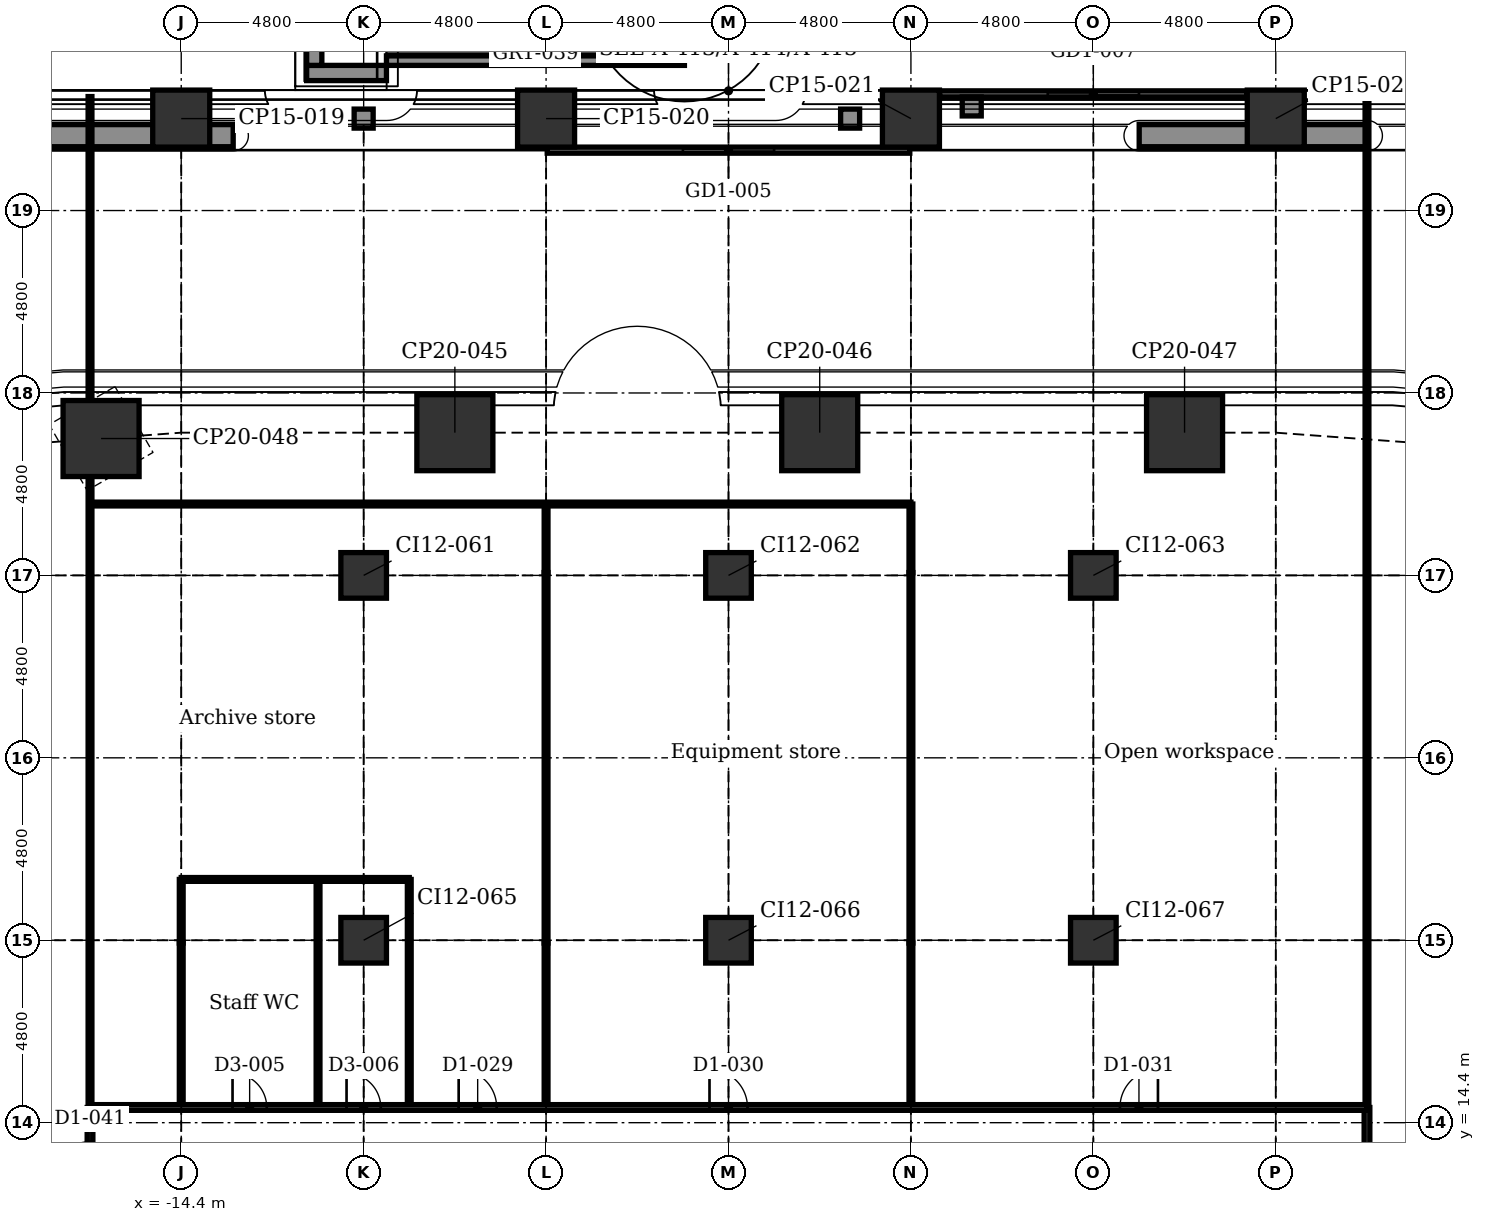
"""IFC4 building model, lengths in metres.
Left out: names, types, materials, properties, quantities, classifications, styles, units other than length and angle.
Written with IfcOpenShell. Run it as: python <this file> out.ifc"""

import sys

from ifc_helpers import new_model, si_unit, direction, frame, frame_2d, origin, origin_2d, place, context, subcontext, project, spatial, polyline, rectangle, outline, extrude, element, fill, save


model = new_model("IFC4")
c1 = context("Model", 3, precision=1e-05, world=origin(), true_north=direction((0.0, 1.0)))
c2 = subcontext(c1, "Body", "Model", "MODEL_VIEW")
j1 = project(units=[si_unit("LENGTHUNIT", "METRE"), si_unit("PLANEANGLEUNIT", "RADIAN")], contexts=[c1])
p1 = place(None, origin())
s1 = spatial("IfcSite", under=j1, at=p1, CompositionType="ELEMENT")
p2 = place(p1, origin())
s2 = spatial("IfcBuilding", under=s1, at=p2, CompositionType="ELEMENT")
p3 = place(p2, frame((0.0, 0.0, 12.4)))
s3 = spatial("IfcBuildingStorey", under=s2, at=p3, CompositionType="ELEMENT", Elevation=12.4)
for number, where, z_axis, x_axis in (
    (1, (-14.4, 40.819, -0.3), (0.0, 0.0, 1.0), (1.0, 0.0, 0.0)),
    (2, (-4.8, 40.819, -0.3), (0.0, 0.0, 1.0), (1.0, 0.0, 0.0)),
    (3, (4.8, 40.819, -0.3), (0.0, 0.0, 1.0), (1.0, 0.0, 0.0)),
    (4, (14.4, 40.819, -0.3), (0.0, 0.0, 1.0), (1.0, 0.0, 0.0)),
):
    element("IfcColumn", number, at=place(p3, frame(where, z_axis=z_axis, x_axis=x_axis)), inside=s3, PredefinedType="COLUMN", context=c2, shape_type="SweptSolid", body=[
        extrude(rectangle(XDim=1.5, YDim=1.5, at=origin_2d()), origin(), (0.0, 0.0, 1.0), 5.05),
    ])
for number, where, z_axis, x_axis in (
    (5, (-16.509, 32.401, -0.3), (0.0, 0.0, 1.0), (0.866, 0.5, 0.0)),
    (6, (-7.2, 32.555, -0.3), (0.0, 0.0, 1.0), (1.0, 0.0, 0.0)),
    (7, (2.4, 32.555, -0.3), (0.0, 0.0, 1.0), (1.0, 0.0, 0.0)),
    (8, (12.0, 32.555, -0.3), (0.0, 0.0, 1.0), (1.0, 0.0, 0.0)),
):
    element("IfcColumn", number, at=place(p3, frame(where, z_axis=z_axis, x_axis=x_axis)), inside=s3, PredefinedType="COLUMN", context=c2, shape_type="SweptSolid", body=[
        extrude(rectangle(XDim=2.0, YDim=2.0, at=origin_2d()), origin(), (0.0, 0.0, 1.0), 5.05),
    ])
for number, where, z_axis, x_axis in (
    (9, (-9.6, 19.2, -0.3), (0.0, 0.0, 1.0), (1.0, 0.0, 0.0)),
    (10, (-9.6, 28.8, -0.3), (0.0, 0.0, 1.0), (1.0, 0.0, 0.0)),
    (11, (0.0, 19.2, -0.3), (0.0, 0.0, 1.0), (1.0, 0.0, 0.0)),
    (12, (0.0, 28.8, -0.3), (0.0, 0.0, 1.0), (1.0, 0.0, 0.0)),
    (13, (9.6, 19.2, -0.3), (0.0, 0.0, 1.0), (1.0, 0.0, 0.0)),
    (14, (9.6, 28.8, -0.3), (0.0, 0.0, 1.0), (1.0, 0.0, 0.0)),
):
    element("IfcColumn", number, at=place(p3, frame(where, z_axis=z_axis, x_axis=x_axis)), inside=s3, PredefinedType="COLUMN", context=c2, shape_type="SweptSolid", body=[
        extrude(rectangle(XDim=1.2, YDim=1.2, at=origin_2d()), origin(), (0.0, 0.0, 1.0), 5.05),
    ])
p4 = place(p3, frame((-4.77, 39.989, 0.0), z_axis=(0.0, 0.0, 1.0), x_axis=(1.0, 0.0, 0.0)))
e15 = element("IfcWall", 15, at=p4, inside=s3, PredefinedType="PARTITIONING", context=c2, shape_type="SweptSolid", body=[
    extrude(rectangle(XDim=9.54, YDim=0.16, at=frame_2d((4.77, 0.0))), origin(), (0.0, 0.0, 1.0), 4.7),
])
p5 = place(p4, frame((3.57, 0.0, 0.0)))
e16 = element("IfcOpeningElement", 16, at=p5, cuts=e15, PredefinedType="OPENING", context=c2, shape_type="SweptSolid", body=[
    extrude(rectangle(XDim=2.4, YDim=2.4, at=frame_2d((1.2, 1.2))), frame((0.0, 0.09, 0.0), z_axis=(0.0, -1.0, 0.0), x_axis=(1.0, 0.0, 0.0)), (0.0, 0.0, 1.0), 0.18),
])
p6 = place(p3, frame((5.552, 41.469, 0.0), z_axis=(0.0, 0.0, 1.0), x_axis=(1.0, 0.0, 0.0)))
e17 = element("IfcWall", 17, at=p6, inside=s3, PredefinedType="PARTITIONING", context=c2, shape_type="SweptSolid", body=[
    extrude(rectangle(XDim=8.096, YDim=0.16, at=frame_2d((4.048, 0.0))), origin(), (0.0, 0.0, 1.0), 4.7),
])
p7 = place(p6, frame((2.848, 0.0, 0.0)))
e18 = element("IfcOpeningElement", 18, at=p7, cuts=e17, PredefinedType="OPENING", context=c2, shape_type="SweptSolid", body=[
    extrude(rectangle(XDim=2.4, YDim=2.4, at=frame_2d((1.2, 1.2))), frame((0.0, 0.09, 0.0), z_axis=(0.0, -1.0, 0.0), x_axis=(1.0, 0.0, 0.0)), (0.0, 0.0, 1.0), 0.18),
])
for number, where, z_axis, x_axis in (
    (19, (10.806, 40.369, 5.0), (0.0, 0.0, 1.0), (1.0, 0.0, 0.0)),
    (20, (-19.033, 40.369, 5.0), (0.0, 0.0, 1.0), (1.0, 0.0, 0.0)),
):
    element("IfcWall", number, at=place(p3, frame(where, z_axis=z_axis, x_axis=x_axis)), inside=s3, PredefinedType="USERDEFINED", context=c2, shape_type="SweptSolid", body=[
        extrude(rectangle(XDim=6.0, YDim=0.6, at=frame_2d((3.0, 0.0))), origin(), (0.0, 0.0, 1.0), 0.7),
    ])
p8 = place(p3, frame((-1.16, 42.344, 0.0), z_axis=(0.0, 0.0, 1.0), x_axis=(-1.0, 0.0, 0.0)))
e21 = element("IfcWall", 21, at=p8, inside=s3, PredefinedType="SOLIDWALL", context=c2, shape_type="SweptSolid", body=[
    extrude(outline(polyline([(0.0, 0.0), (7.84, 0.0), (7.84, 5.1), (0.0, 0.272), (0.0, 0.0)])), frame((0.0, 0.125, 0.0), z_axis=(0.0, -1.0, 0.0), x_axis=(1.0, 0.0, 0.0)), (0.0, 0.0, 1.0), 0.25),
])
p9 = place(p3, frame((-11.1, 42.019, 0.45), z_axis=(0.0, 0.0, 1.0), x_axis=(1.0, 0.0, 0.0)))
e22 = element("IfcWall", 22, at=p9, inside=s3, PredefinedType="SOLIDWALL", context=c2, shape_type="SweptSolid", body=[
    extrude(rectangle(XDim=2.1, YDim=0.4, at=frame_2d((1.05, 0.0))), origin(), (0.0, 0.0, 1.0), 4.35),
])
p10 = place(p3, frame((-10.9, 42.219, 0.45), z_axis=(0.0, 0.0, 1.0), x_axis=(0.0, 1.0, 0.0)))
e23 = element("IfcWall", 23, at=p10, inside=s3, PredefinedType="SOLIDWALL", context=c2, shape_type="SweptSolid", body=[
    extrude(rectangle(XDim=2.25, YDim=0.4, at=frame_2d((1.125, 0.0))), origin(), (0.0, 0.0, 1.0), 4.35),
])
for number, where, z_axis, x_axis in (
    (24, (-9.85, 40.819, 0.0), (0.0, 0.0, 1.0), (1.0, 0.0, 0.0)),
    (25, (2.95, 40.819, 0.0), (0.0, 0.0, 1.0), (1.0, 0.0, 0.0)),
    (26, (6.15, 41.139, 0.0), (0.0, 0.0, 1.0), (1.0, 0.0, 0.0)),
):
    element("IfcWall", number, at=place(p3, frame(where, z_axis=z_axis, x_axis=x_axis)), inside=s3, PredefinedType="SOLIDWALL", context=c2, shape_type="SweptSolid", body=[
        extrude(rectangle(XDim=0.5, YDim=0.5, at=frame_2d((0.25, 0.0))), origin(), (0.0, 0.0, 1.0), 4.45),
    ])
p11 = place(p3, frame((16.8, 14.8, 0.0), z_axis=(0.0, 0.0, 1.0), x_axis=(0.0, 1.0, 0.0)))
e27 = element("IfcWall", 27, at=p11, inside=s3, PredefinedType="PARTITIONING", context=c2, shape_type="SweptSolid", body=[
    extrude(rectangle(XDim=26.599, YDim=0.1, at=frame_2d((13.3, 0.0))), origin(), (0.0, 0.0, 1.0), 4.7),
])
p12 = place(p3, frame((16.8, 3.95, 0.0), z_axis=(0.0, 0.0, 1.0), x_axis=(0.0, 1.0, 0.0)))
e28 = element("IfcWall", 28, at=p12, inside=s3, PredefinedType="PARTITIONING", context=c2, shape_type="SweptSolid", body=[
    extrude(rectangle(XDim=10.85, YDim=0.15, at=frame_2d((5.425, 0.0))), origin(), (0.0, 0.0, 1.0), 4.7),
])
p13 = place(p12, frame((1.25, 0.0, 0.0)))
e29 = element("IfcOpeningElement", 29, at=p13, cuts=e28, PredefinedType="OPENING", context=c2, shape_type="SweptSolid", body=[
    extrude(rectangle(XDim=1.0, YDim=2.1, at=frame_2d((0.5, 1.05))), frame((0.0, 0.085, 0.0), z_axis=(0.0, -1.0, 0.0), x_axis=(1.0, 0.0, 0.0)), (0.0, 0.0, 1.0), 0.17),
])
p14 = place(p12, frame((7.95, 0.0, 0.0)))
e30 = element("IfcOpeningElement", 30, at=p14, cuts=e28, PredefinedType="OPENING", context=c2, shape_type="SweptSolid", body=[
    extrude(rectangle(XDim=1.0, YDim=2.1, at=frame_2d((0.5, 1.05))), frame((0.0, 0.085, 0.0), z_axis=(0.0, -1.0, 0.0), x_axis=(1.0, 0.0, 0.0)), (0.0, 0.0, 1.0), 0.17),
])
p15 = place(p3, frame((4.8, 19.126, 0.0), z_axis=(0.0, 0.0, 1.0), x_axis=(0.0, 1.0, 0.0)))
e31 = element("IfcWall", 31, at=p15, inside=s3, PredefinedType="PARTITIONING", context=c2, shape_type="SweptSolid", body=[
    extrude(rectangle(XDim=9.748, YDim=0.1, at=frame_2d((4.874, 0.0))), origin(), (0.0, 0.0, 1.0), 4.293),
])
p16 = place(p3, frame((4.8, 14.8, 0.0), z_axis=(0.0, 0.0, 1.0), x_axis=(0.0, 1.0, 0.0)))
e32 = element("IfcWall", 32, at=p16, inside=s3, PredefinedType="PARTITIONING", context=c2, shape_type="SweptSolid", body=[
    extrude(rectangle(XDim=4.326, YDim=0.1, at=frame_2d((2.163, 0.0))), origin(), (0.0, 0.0, 1.0), 4.343),
])
p17 = place(p3, frame((4.8, 28.874, 0.0), z_axis=(0.0, 0.0, 1.0), x_axis=(0.0, 1.0, 0.0)))
e33 = element("IfcWall", 33, at=p17, inside=s3, PredefinedType="PARTITIONING", context=c2, shape_type="SweptSolid", body=[
    extrude(rectangle(XDim=1.804, YDim=0.1, at=frame_2d((0.902, 0.0))), origin(), (0.0, 0.0, 1.0), 4.44),
])
p18 = place(p3, frame((-4.8, 19.126, 0.0), z_axis=(0.0, 0.0, 1.0), x_axis=(0.0, 1.0, 0.0)))
e34 = element("IfcWall", 34, at=p18, inside=s3, PredefinedType="PARTITIONING", context=c2, shape_type="SweptSolid", body=[
    extrude(rectangle(XDim=9.748, YDim=0.1, at=frame_2d((4.874, 0.0))), origin(), (0.0, 0.0, 1.0), 4.293),
])
p19 = place(p3, frame((-4.8, 14.8, 0.0), z_axis=(0.0, 0.0, 1.0), x_axis=(0.0, 1.0, 0.0)))
e35 = element("IfcWall", 35, at=p19, inside=s3, PredefinedType="PARTITIONING", context=c2, shape_type="SweptSolid", body=[
    extrude(rectangle(XDim=4.326, YDim=0.1, at=frame_2d((2.163, 0.0))), origin(), (0.0, 0.0, 1.0), 4.343),
])
p20 = place(p3, frame((-4.8, 28.874, 0.0), z_axis=(0.0, 0.0, 1.0), x_axis=(0.0, 1.0, 0.0)))
e36 = element("IfcWall", 36, at=p20, inside=s3, PredefinedType="PARTITIONING", context=c2, shape_type="SweptSolid", body=[
    extrude(rectangle(XDim=1.804, YDim=0.1, at=frame_2d((0.902, 0.0))), origin(), (0.0, 0.0, 1.0), 4.44),
])
for number, where, z_axis, x_axis in (
    (37, (-8.4, 14.8, 0.0), (0.0, 0.0, 1.0), (0.0, 1.0, 0.0)),
    (38, (-10.8, 14.8, 0.0), (0.0, 0.0, 1.0), (0.0, 1.0, 0.0)),
):
    element("IfcWall", number, at=place(p3, frame(where, z_axis=z_axis, x_axis=x_axis)), inside=s3, PredefinedType="PARTITIONING", context=c2, shape_type="SweptSolid", body=[
        extrude(rectangle(XDim=6.0, YDim=0.1, at=frame_2d((3.0, 0.0))), origin(), (0.0, 0.0, 1.0), 4.7),
    ])
p21 = place(p3, frame((-14.4, 14.8, 0.0), z_axis=(0.0, 0.0, 1.0), x_axis=(0.0, 1.0, 0.0)))
e39 = element("IfcWall", 39, at=p21, inside=s3, PredefinedType="PARTITIONING", context=c2, shape_type="SweptSolid", body=[
    extrude(rectangle(XDim=4.326, YDim=0.1, at=frame_2d((2.163, 0.0))), origin(), (0.0, 0.0, 1.0), 4.343),
])
p22 = place(p3, frame((-14.4, 19.126, 0.0), z_axis=(0.0, 0.0, 1.0), x_axis=(0.0, 1.0, 0.0)))
e40 = element("IfcWall", 40, at=p22, inside=s3, PredefinedType="PARTITIONING", context=c2, shape_type="SweptSolid", body=[
    extrude(rectangle(XDim=1.674, YDim=0.1, at=frame_2d((0.837, 0.0))), origin(), (0.0, 0.0, 1.0), 4.293),
])
p23 = place(p3, frame((-16.8, 14.8, 0.0), z_axis=(0.0, 0.0, 1.0), x_axis=(0.0, 1.0, 0.0)))
e41 = element("IfcWall", 41, at=p23, inside=s3, PredefinedType="PARTITIONING", context=c2, shape_type="SweptSolid", body=[
    extrude(rectangle(XDim=26.599, YDim=0.1, at=frame_2d((13.3, 0.0))), origin(), (0.0, 0.0, 1.0), 4.7),
])
p24 = place(p3, frame((-16.8, 3.95, 0.0), z_axis=(0.0, 0.0, 1.0), x_axis=(0.0, 1.0, 0.0)))
e42 = element("IfcWall", 42, at=p24, inside=s3, PredefinedType="PARTITIONING", context=c2, shape_type="SweptSolid", body=[
    extrude(rectangle(XDim=10.85, YDim=0.15, at=frame_2d((5.425, 0.0))), origin(), (0.0, 0.0, 1.0), 4.7),
])
p25 = place(p24, frame((2.45, 0.0, 0.0)))
e43 = element("IfcOpeningElement", 43, at=p25, cuts=e42, PredefinedType="OPENING", context=c2, shape_type="SweptSolid", body=[
    extrude(rectangle(XDim=1.0, YDim=2.1, at=frame_2d((0.5, 1.05))), frame((0.0, 0.085, 0.0), z_axis=(0.0, -1.0, 0.0), x_axis=(1.0, 0.0, 0.0)), (0.0, 0.0, 1.0), 0.17),
])
p26 = place(p24, frame((8.95, 0.0, 0.0)))
e44 = element("IfcOpeningElement", 44, at=p26, cuts=e42, PredefinedType="OPENING", context=c2, shape_type="SweptSolid", body=[
    extrude(rectangle(XDim=1.0, YDim=2.1, at=frame_2d((0.5, 1.05))), frame((0.0, 0.085, 0.0), z_axis=(0.0, -1.0, 0.0), x_axis=(1.0, 0.0, 0.0)), (0.0, 0.0, 1.0), 0.17),
])
p27 = place(p3, frame((-16.8, 14.8, 0.0), z_axis=(0.0, 0.0, 1.0), x_axis=(1.0, 0.0, 0.0)))
e45 = element("IfcWall", 45, at=p27, inside=s3, PredefinedType="PARTITIONING", context=c2, shape_type="SweptSolid", body=[
    extrude(rectangle(XDim=33.6, YDim=0.15, at=frame_2d((16.8, 0.0))), origin(), (0.0, 0.0, 1.0), 4.7),
])
p28 = place(p27, frame((3.75, 0.0, 0.0)))
e46 = element("IfcOpeningElement", 46, at=p28, cuts=e45, PredefinedType="OPENING", context=c2, shape_type="SweptSolid", body=[
    extrude(rectangle(XDim=0.9, YDim=2.1, at=frame_2d((0.45, 1.05))), frame((0.0, 0.085, 0.0), z_axis=(0.0, -1.0, 0.0), x_axis=(1.0, 0.0, 0.0)), (0.0, 0.0, 1.0), 0.17),
])
p29 = place(p27, frame((6.75, 0.0, 0.0)))
e47 = element("IfcOpeningElement", 47, at=p29, cuts=e45, PredefinedType="OPENING", context=c2, shape_type="SweptSolid", body=[
    extrude(rectangle(XDim=0.9, YDim=2.1, at=frame_2d((0.45, 1.05))), frame((0.0, 0.085, 0.0), z_axis=(0.0, -1.0, 0.0), x_axis=(1.0, 0.0, 0.0)), (0.0, 0.0, 1.0), 0.17),
])
p30 = place(p27, frame((9.7, 0.0, 0.0)))
e48 = element("IfcOpeningElement", 48, at=p30, cuts=e45, PredefinedType="OPENING", context=c2, shape_type="SweptSolid", body=[
    extrude(rectangle(XDim=1.0, YDim=2.1, at=frame_2d((0.5, 1.05))), frame((0.0, 0.085, 0.0), z_axis=(0.0, -1.0, 0.0), x_axis=(1.0, 0.0, 0.0)), (0.0, 0.0, 1.0), 0.17),
])
p31 = place(p27, frame((16.3, 0.0, 0.0)))
e49 = element("IfcOpeningElement", 49, at=p31, cuts=e45, PredefinedType="OPENING", context=c2, shape_type="SweptSolid", body=[
    extrude(rectangle(XDim=1.0, YDim=2.1, at=frame_2d((0.5, 1.05))), frame((0.0, 0.085, 0.0), z_axis=(0.0, -1.0, 0.0), x_axis=(1.0, 0.0, 0.0)), (0.0, 0.0, 1.0), 0.17),
])
p32 = place(p27, frame((27.1, 0.0, 0.0)))
e50 = element("IfcOpeningElement", 50, at=p32, cuts=e45, PredefinedType="OPENING", context=c2, shape_type="SweptSolid", body=[
    extrude(rectangle(XDim=1.0, YDim=2.1, at=frame_2d((0.5, 1.05))), frame((0.0, 0.085, 0.0), z_axis=(0.0, -1.0, 0.0), x_axis=(1.0, 0.0, 0.0)), (0.0, 0.0, 1.0), 0.17),
])
p33 = place(p3, frame((-14.4, 20.8, 0.0), z_axis=(0.0, 0.0, 1.0), x_axis=(1.0, 0.0, 0.0)))
e51 = element("IfcWall", 51, at=p33, inside=s3, PredefinedType="PARTITIONING", context=c2, shape_type="SweptSolid", body=[
    extrude(rectangle(XDim=6.0, YDim=0.1, at=frame_2d((3.0, 0.0))), origin(), (0.0, 0.0, 1.0), 4.7),
])
p34 = place(p3, frame((-16.8, 30.678, 0.0), z_axis=(0.0, 0.0, 1.0), x_axis=(1.0, 0.0, 0.0)))
e52 = element("IfcWall", 52, at=p34, inside=s3, PredefinedType="PARTITIONING", context=c2, shape_type="SweptSolid", body=[
    extrude(rectangle(XDim=21.6, YDim=0.1, at=frame_2d((10.8, 0.0))), origin(), (0.0, 0.0, 1.0), 4.7),
])
p35 = place(p5, origin())
e53 = element("IfcDoor", 53, at=p35, inside=s3, OperationType="DOUBLE_DOOR_SLIDING", PredefinedType="DOOR", context=c2, shape_type="SweptSolid", body=[
    extrude(rectangle(XDim=2.4, YDim=2.4, at=frame_2d((1.2, 1.2))), frame((0.0, 0.025, 0.0), z_axis=(0.0, -1.0, 0.0), x_axis=(1.0, 0.0, 0.0)), (0.0, 0.0, 1.0), 0.05),
])
fill(e16, e53)
p36 = place(p7, origin())
e54 = element("IfcDoor", 54, at=p36, inside=s3, OperationType="DOUBLE_DOOR_SLIDING", PredefinedType="DOOR", context=c2, shape_type="SweptSolid", body=[
    extrude(rectangle(XDim=2.4, YDim=2.4, at=frame_2d((1.2, 1.2))), frame((0.0, 0.025, 0.0), z_axis=(0.0, -1.0, 0.0), x_axis=(1.0, 0.0, 0.0)), (0.0, 0.0, 1.0), 0.05),
])
fill(e18, e54)
p37 = place(p28, origin())
e55 = element("IfcDoor", 55, at=p37, inside=s3, OperationType="SINGLE_SWING_LEFT", PredefinedType="DOOR", context=c2, shape_type="SweptSolid", body=[
    extrude(rectangle(XDim=0.9, YDim=2.1, at=frame_2d((0.45, 1.05))), frame((0.0, 0.025, 0.0), z_axis=(0.0, -1.0, 0.0), x_axis=(1.0, 0.0, 0.0)), (0.0, 0.0, 1.0), 0.05),
])
fill(e46, e55)
p38 = place(p29, origin())
e56 = element("IfcDoor", 56, at=p38, inside=s3, OperationType="SINGLE_SWING_LEFT", PredefinedType="DOOR", context=c2, shape_type="SweptSolid", body=[
    extrude(rectangle(XDim=0.9, YDim=2.1, at=frame_2d((0.45, 1.05))), frame((0.0, 0.025, 0.0), z_axis=(0.0, -1.0, 0.0), x_axis=(1.0, 0.0, 0.0)), (0.0, 0.0, 1.0), 0.05),
])
fill(e47, e56)
p39 = place(p30, origin())
e57 = element("IfcDoor", 57, at=p39, inside=s3, OperationType="SINGLE_SWING_LEFT", PredefinedType="DOOR", context=c2, shape_type="SweptSolid", body=[
    extrude(rectangle(XDim=1.0, YDim=2.1, at=frame_2d((0.5, 1.05))), frame((0.0, 0.025, 0.0), z_axis=(0.0, -1.0, 0.0), x_axis=(1.0, 0.0, 0.0)), (0.0, 0.0, 1.0), 0.05),
])
fill(e48, e57)
p40 = place(p31, origin())
e58 = element("IfcDoor", 58, at=p40, inside=s3, OperationType="SINGLE_SWING_LEFT", PredefinedType="DOOR", context=c2, shape_type="SweptSolid", body=[
    extrude(rectangle(XDim=1.0, YDim=2.1, at=frame_2d((0.5, 1.05))), frame((0.0, 0.025, 0.0), z_axis=(0.0, -1.0, 0.0), x_axis=(1.0, 0.0, 0.0)), (0.0, 0.0, 1.0), 0.05),
])
fill(e49, e58)
p41 = place(p32, origin())
e59 = element("IfcDoor", 59, at=p41, inside=s3, OperationType="SINGLE_SWING_RIGHT", PredefinedType="DOOR", context=c2, shape_type="SweptSolid", body=[
    extrude(rectangle(XDim=1.0, YDim=2.1, at=frame_2d((0.5, 1.05))), frame((0.0, 0.025, 0.0), z_axis=(0.0, -1.0, 0.0), x_axis=(1.0, 0.0, 0.0)), (0.0, 0.0, 1.0), 0.05),
])
fill(e50, e59)
p42 = place(p26, origin())
e60 = element("IfcDoor", 60, at=p42, inside=s3, OperationType="SINGLE_SWING_LEFT", PredefinedType="DOOR", context=c2, shape_type="SweptSolid", body=[
    extrude(rectangle(XDim=1.0, YDim=2.1, at=frame_2d((0.5, 1.05))), frame((0.0, 0.025, 0.0), z_axis=(0.0, -1.0, 0.0), x_axis=(1.0, 0.0, 0.0)), (0.0, 0.0, 1.0), 0.05),
])
fill(e44, e60)
save(model, sys.argv[1])
